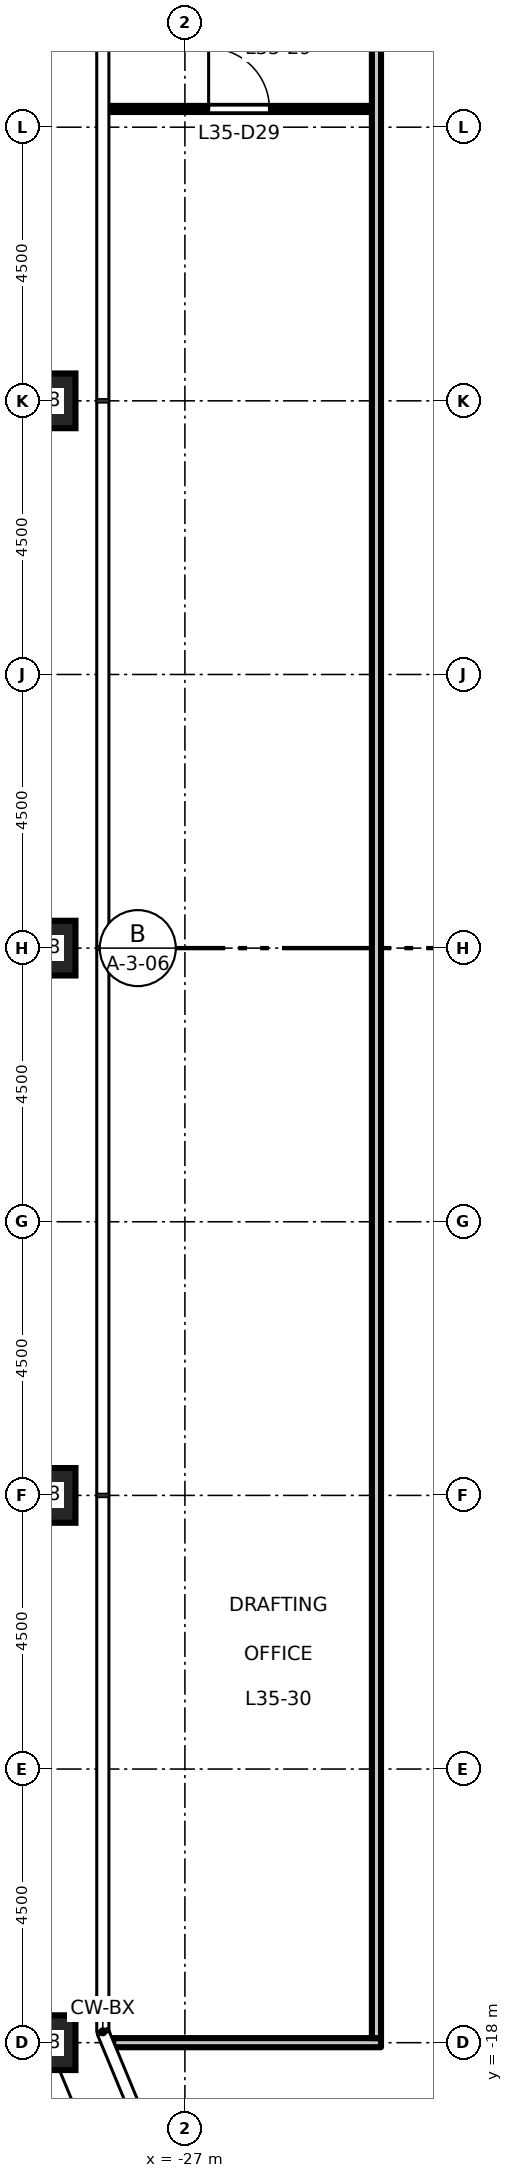
"""IFC4 building model, lengths in metres.
Left out: names, types, materials, properties, quantities, classifications, styles, units other than length and angle.
Written with IfcOpenShell. Run it as: python <this file> out.ifc"""

import sys

from ifc_helpers import new_model, si_unit, direction, frame, frame_2d, origin, origin_2d, place, context, subcontext, project, spatial, rectangle, hollow_rectangle, extrude, element, fill, save


model = new_model("IFC4")
c1 = context("Model", 3, precision=1e-05, world=origin(), true_north=direction((0.0, 1.0)))
c2 = subcontext(c1, "Body", "Model", "MODEL_VIEW")
j1 = project(units=[si_unit("LENGTHUNIT", "METRE"), si_unit("PLANEANGLEUNIT", "RADIAN")], contexts=[c1])
p1 = place(None, origin())
s1 = spatial("IfcSite", under=j1, at=p1, CompositionType="ELEMENT")
p2 = place(p1, origin())
s2 = spatial("IfcBuilding", under=s1, at=p2, CompositionType="ELEMENT")
p3 = place(p2, frame((0.0, 0.0, 163.2)))
s3 = spatial("IfcBuildingStorey", under=s2, at=p3, CompositionType="ELEMENT", Elevation=163.2)
for number, where, z_axis, x_axis in (
    (1, (-29.25, 9.0, 0.0), (0.0, 0.0, 1.0), (1.0, 0.0, 0.0)),
    (2, (-29.25, 0.0, 0.0), (0.0, 0.0, 1.0), (1.0, 0.0, 0.0)),
    (3, (-29.25, -9.0, 0.0), (0.0, 0.0, 1.0), (1.0, 0.0, 0.0)),
    (4, (-29.25, -18.0, 0.0), (0.0, 0.0, 1.0), (1.0, 0.0, 0.0)),
):
    element("IfcColumn", number, at=place(p3, frame(where, z_axis=z_axis, x_axis=x_axis)), inside=s3, PredefinedType="COLUMN", context=c2, shape_type="SweptSolid", body=[
        extrude(hollow_rectangle(XDim=0.9, YDim=0.9, WallThickness=0.05, at=origin_2d()), origin(), (0.0, 0.0, 1.0), 4.5),
    ])
p4 = place(p3, frame((-28.178, -18.0, 0.0), z_axis=(0.0, 0.0, 1.0), x_axis=(1.0, 0.0, 0.0)))
e5 = element("IfcWall", 5, at=p4, inside=s3, PredefinedType="PARTITIONING", context=c2, shape_type="SweptSolid", body=[
    extrude(rectangle(XDim=4.403, YDim=0.15, at=frame_2d((2.202, 0.0))), origin(), (0.0, 0.0, 1.0), 4.35),
])
p5 = place(p3, frame((-28.26, 13.8, 0.0), z_axis=(0.0, 0.0, 1.0), x_axis=(1.0, 0.0, 0.0)))
e6 = element("IfcWall", 6, at=p5, inside=s3, PredefinedType="PARTITIONING", context=c2, shape_type="SweptSolid", body=[
    extrude(rectangle(XDim=4.335, YDim=0.1, at=frame_2d((2.167, 0.0))), origin(), (0.0, 0.0, 1.0), 4.35),
])
p6 = place(p5, frame((1.65, 0.0, 0.0)))
e7 = element("IfcOpeningElement", 7, at=p6, cuts=e6, PredefinedType="OPENING", context=c2, shape_type="SweptSolid", body=[
    extrude(rectangle(XDim=1.0, YDim=2.1, at=frame_2d((0.5, 1.05))), frame((0.0, 0.06, 0.0), z_axis=(0.0, -1.0, 0.0), x_axis=(1.0, 0.0, 0.0)), (0.0, 0.0, 1.0), 0.12),
])
p7 = place(p3, frame((-23.85, -17.925, 0.0), z_axis=(0.0, 0.0, 1.0), x_axis=(0.0, 1.0, 0.0)))
e8 = element("IfcWall", 8, at=p7, inside=s3, PredefinedType="PARTITIONING", context=c2, shape_type="SweptSolid", body=[
    extrude(rectangle(XDim=35.85, YDim=0.15, at=frame_2d((17.925, 0.0))), origin(), (0.0, 0.0, 1.0), 4.35),
])
p8 = place(p6, origin())
e9 = element("IfcDoor", 9, at=p8, inside=s3, OperationType="SINGLE_SWING_LEFT", PredefinedType="DOOR", context=c2, shape_type="SweptSolid", body=[
    extrude(rectangle(XDim=1.0, YDim=2.1, at=frame_2d((0.5, 1.05))), frame((0.0, 0.025, 0.0), z_axis=(0.0, -1.0, 0.0), x_axis=(1.0, 0.0, 0.0)), (0.0, 0.0, 1.0), 0.05),
])
fill(e7, e9)
save(model, sys.argv[1])
